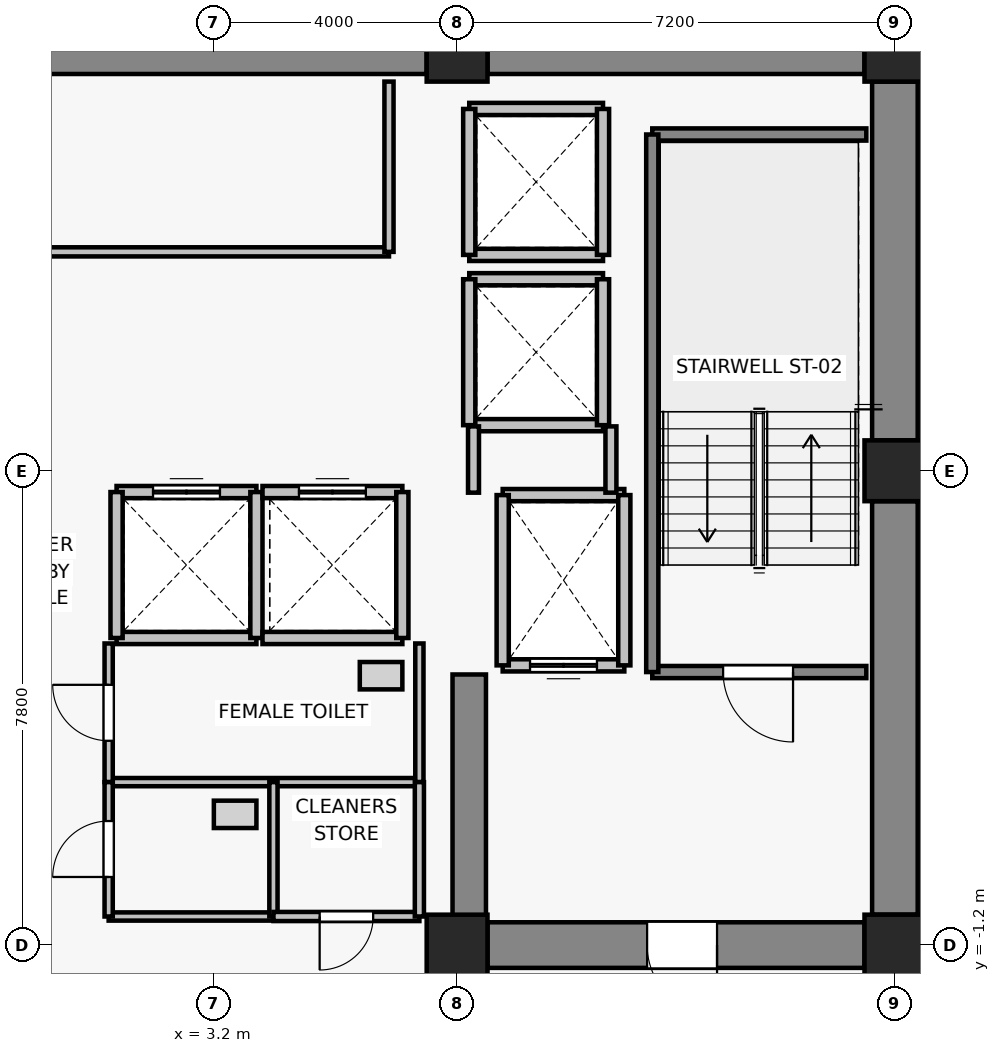
"""IFC4 building model, lengths in metres.
Left out: names, types, materials, properties, quantities, classifications, styles, units other than length and angle.
Written with IfcOpenShell. Run it as: python <this file> out.ifc"""

import sys

from ifc_helpers import new_model, si_unit, direction, frame, frame_2d, origin, origin_2d, place, context, subcontext, project, spatial, rectangle, extrude, source, transform, mapped, element, fill, save


model = new_model("IFC4")
c1 = context("Model", 3, precision=1e-05, world=origin(), true_north=direction((0.0, 1.0)))
c2 = subcontext(c1, "Body", "Model", "MODEL_VIEW")
j1 = project(units=[si_unit("LENGTHUNIT", "METRE"), si_unit("PLANEANGLEUNIT", "RADIAN")], contexts=[c1])
p1 = place(None, origin())
s1 = spatial("IfcSite", under=j1, at=p1, CompositionType="ELEMENT")
p2 = place(p1, origin())
s2 = spatial("IfcBuilding", under=s1, at=p2, CompositionType="ELEMENT")
p3 = place(p2, frame((0.0, 0.0, 103.3)))
s3 = spatial("IfcBuildingStorey", under=s2, at=p3, CompositionType="ELEMENT", Elevation=103.3)
for number, where, z_axis, x_axis in (
    (1, (7.2, -1.2, 0.0), (0.0, 0.0, 1.0), (1.0, 0.0, 0.0)),
    (2, (14.4, -1.2, 0.0), (0.0, 0.0, 1.0), (1.0, 0.0, 0.0)),
    (3, (14.4, 6.6, 0.0), (0.0, 0.0, 1.0), (1.0, 0.0, 0.0)),
    (4, (7.2, 13.5, 0.0), (0.0, 0.0, 1.0), (1.0, 0.0, 0.0)),
    (5, (14.4, 13.5, 0.0), (0.0, 0.0, 1.0), (1.0, 0.0, 0.0)),
):
    element("IfcColumn", number, at=place(p3, frame(where, z_axis=z_axis, x_axis=x_axis)), inside=s3, PredefinedType="COLUMN", context=c2, shape_type="SweptSolid", body=[
        extrude(rectangle(XDim=1.0, YDim=1.0, at=origin_2d()), origin(), (0.0, 0.0, 1.0), 3.3),
    ])
p4 = place(p3, frame((-6.7, 13.5, 0.0), z_axis=(0.0, 0.0, 1.0), x_axis=(1.0, 0.0, 0.0)))
e6 = element("IfcWall", 6, at=p4, inside=s3, PredefinedType="SHEAR", context=c2, shape_type="SweptSolid", body=[
    extrude(rectangle(XDim=13.4, YDim=0.75, at=frame_2d((6.7, 0.0))), origin(), (0.0, 0.0, 1.0), 3.075),
])
p5 = place(p3, frame((7.7, 13.5, 0.0), z_axis=(0.0, 0.0, 1.0), x_axis=(1.0, 0.0, 0.0)))
e7 = element("IfcWall", 7, at=p5, inside=s3, PredefinedType="SHEAR", context=c2, shape_type="SweptSolid", body=[
    extrude(rectangle(XDim=6.2, YDim=0.75, at=frame_2d((3.1, 0.0))), origin(), (0.0, 0.0, 1.0), 3.075),
])
p6 = place(p3, frame((14.4, -0.7, 0.0), z_axis=(0.0, 0.0, 1.0), x_axis=(0.0, 1.0, 0.0)))
e8 = element("IfcWall", 8, at=p6, inside=s3, PredefinedType="SHEAR", context=c2, shape_type="SweptSolid", body=[
    extrude(rectangle(XDim=6.8, YDim=0.75, at=frame_2d((3.4, 0.0))), origin(), (0.0, 0.0, 1.0), 3.075),
])
p7 = place(p3, frame((14.4, 7.1, 0.0), z_axis=(0.0, 0.0, 1.0), x_axis=(0.0, 1.0, 0.0)))
e9 = element("IfcWall", 9, at=p7, inside=s3, PredefinedType="SHEAR", context=c2, shape_type="SweptSolid", body=[
    extrude(rectangle(XDim=5.9, YDim=0.75, at=frame_2d((2.95, 0.0))), origin(), (0.0, 0.0, 1.0), 3.075),
])
p8 = place(p3, frame((13.9, -1.2, 0.0), z_axis=(0.0, 0.0, 1.0), x_axis=(-1.0, 0.0, 0.0)))
e10 = element("IfcWall", 10, at=p8, inside=s3, PredefinedType="SHEAR", context=c2, shape_type="SweptSolid", body=[
    extrude(rectangle(XDim=6.2, YDim=0.75, at=frame_2d((3.1, 0.0))), origin(), (0.0, 0.0, 1.0), 3.075),
])
p9 = place(p8, frame((2.425, 0.0, 0.0)))
e11 = element("IfcOpeningElement", 11, at=p9, cuts=e10, PredefinedType="OPENING", context=c2, shape_type="SweptSolid", body=[
    extrude(rectangle(XDim=1.15, YDim=2.15, at=frame_2d((0.575, 1.075))), frame((0.0, 0.385, 0.0), z_axis=(0.0, -1.0, 0.0), x_axis=(1.0, 0.0, 0.0)), (0.0, 0.0, 1.0), 0.77),
])
p10 = place(p3, frame((7.4, -0.825, 0.0), z_axis=(0.0, 0.0, 1.0), x_axis=(0.0, 1.0, 0.0)))
e12 = element("IfcWall", 12, at=p10, inside=s3, PredefinedType="SHEAR", context=c2, shape_type="SweptSolid", body=[
    extrude(rectangle(XDim=4.075, YDim=0.55, at=frame_2d((2.038, 0.0))), origin(), (0.0, 0.0, 1.0), 3.075),
])
p11 = place(p3, frame((9.95, 3.4, 0.0), z_axis=(0.0, 0.0, 1.0), x_axis=(-1.0, 0.0, 0.0)))
e13 = element("IfcWall", 13, at=p11, inside=s3, PredefinedType="SOLIDWALL", context=c2, shape_type="SweptSolid", body=[
    extrude(rectangle(XDim=2.0, YDim=0.2, at=frame_2d((1.0, 0.0))), origin(), (0.0, 0.0, 1.0), 3.075),
])
p12 = place(p11, frame((0.45, 0.0, 0.0)))
e14 = element("IfcOpeningElement", 14, at=p12, cuts=e13, PredefinedType="OPENING", context=c2, shape_type="SweptSolid", body=[
    extrude(rectangle(XDim=1.1, YDim=2.2, at=frame_2d((0.55, 1.1))), frame((0.0, 0.11, 0.0), z_axis=(0.0, -1.0, 0.0), x_axis=(1.0, 0.0, 0.0)), (0.0, 0.0, 1.0), 0.22),
])
p13 = place(p3, frame((7.95, 6.2, 0.0), z_axis=(0.0, 0.0, 1.0), x_axis=(1.0, 0.0, 0.0)))
e15 = element("IfcWall", 15, at=p13, inside=s3, PredefinedType="SOLIDWALL", context=c2, shape_type="SweptSolid", body=[
    extrude(rectangle(XDim=2.0, YDim=0.2, at=frame_2d((1.0, 0.0))), origin(), (0.0, 0.0, 1.0), 3.075),
])
for number, where, z_axis, x_axis in (
    (16, (7.95, 3.4, 0.0), (0.0, 0.0, 1.0), (0.0, 1.0, 0.0)),
    (17, (9.95, 6.2, 0.0), (0.0, 0.0, 1.0), (0.0, -1.0, 0.0)),
):
    element("IfcWall", number, at=place(p3, frame(where, z_axis=z_axis, x_axis=x_axis)), inside=s3, PredefinedType="SOLIDWALL", context=c2, shape_type="SweptSolid", body=[
        extrude(rectangle(XDim=2.8, YDim=0.2, at=frame_2d((1.4, 0.0))), origin(), (0.0, 0.0, 1.0), 3.075),
    ])
p14 = place(p3, frame((3.9, 3.85, 0.0), z_axis=(0.0, 0.0, 1.0), x_axis=(-1.0, 0.0, 0.0)))
e18 = element("IfcWall", 18, at=p14, inside=s3, PredefinedType="SOLIDWALL", context=c2, shape_type="SweptSolid", body=[
    extrude(rectangle(XDim=2.3, YDim=0.2, at=frame_2d((1.15, 0.0))), origin(), (0.0, 0.0, 1.0), 3.075),
])
p15 = place(p3, frame((1.6, 6.25, 0.0), z_axis=(0.0, 0.0, 1.0), x_axis=(1.0, 0.0, 0.0)))
e19 = element("IfcWall", 19, at=p15, inside=s3, PredefinedType="SOLIDWALL", context=c2, shape_type="SweptSolid", body=[
    extrude(rectangle(XDim=2.3, YDim=0.2, at=frame_2d((1.15, 0.0))), origin(), (0.0, 0.0, 1.0), 3.075),
])
p16 = place(p15, frame((0.6, 0.0, 0.0)))
e20 = element("IfcOpeningElement", 20, at=p16, cuts=e19, PredefinedType="OPENING", context=c2, shape_type="SweptSolid", body=[
    extrude(rectangle(XDim=1.1, YDim=2.2, at=frame_2d((0.55, 1.1))), frame((0.0, 0.11, 0.0), z_axis=(0.0, -1.0, 0.0), x_axis=(1.0, 0.0, 0.0)), (0.0, 0.0, 1.0), 0.22),
])
for number, where, z_axis, x_axis in (
    (21, (1.6, 3.85, 0.0), (0.0, 0.0, 1.0), (0.0, 1.0, 0.0)),
    (22, (3.9, 6.25, 0.0), (0.0, 0.0, 1.0), (0.0, -1.0, 0.0)),
):
    element("IfcWall", number, at=place(p3, frame(where, z_axis=z_axis, x_axis=x_axis)), inside=s3, PredefinedType="SOLIDWALL", context=c2, shape_type="SweptSolid", body=[
        extrude(rectangle(XDim=2.4, YDim=0.2, at=frame_2d((1.2, 0.0))), origin(), (0.0, 0.0, 1.0), 3.075),
    ])
p17 = place(p3, frame((6.3, 3.85, 0.0), z_axis=(0.0, 0.0, 1.0), x_axis=(-1.0, 0.0, 0.0)))
e23 = element("IfcWall", 23, at=p17, inside=s3, PredefinedType="SOLIDWALL", context=c2, shape_type="SweptSolid", body=[
    extrude(rectangle(XDim=2.3, YDim=0.2, at=frame_2d((1.15, 0.0))), origin(), (0.0, 0.0, 1.0), 3.075),
])
p18 = place(p3, frame((4.0, 6.25, 0.0), z_axis=(0.0, 0.0, 1.0), x_axis=(1.0, 0.0, 0.0)))
e24 = element("IfcWall", 24, at=p18, inside=s3, PredefinedType="SOLIDWALL", context=c2, shape_type="SweptSolid", body=[
    extrude(rectangle(XDim=2.3, YDim=0.2, at=frame_2d((1.15, 0.0))), origin(), (0.0, 0.0, 1.0), 3.075),
])
p19 = place(p18, frame((0.6, 0.0, 0.0)))
e25 = element("IfcOpeningElement", 25, at=p19, cuts=e24, PredefinedType="OPENING", context=c2, shape_type="SweptSolid", body=[
    extrude(rectangle(XDim=1.1, YDim=2.2, at=frame_2d((0.55, 1.1))), frame((0.0, 0.11, 0.0), z_axis=(0.0, -1.0, 0.0), x_axis=(1.0, 0.0, 0.0)), (0.0, 0.0, 1.0), 0.22),
])
p20 = place(p3, frame((6.3, 6.25, 0.0), z_axis=(0.0, 0.0, 1.0), x_axis=(0.0, -1.0, 0.0)))
e26 = element("IfcWall", 26, at=p20, inside=s3, PredefinedType="SOLIDWALL", context=c2, shape_type="SweptSolid", body=[
    extrude(rectangle(XDim=2.4, YDim=0.2, at=frame_2d((1.2, 0.0))), origin(), (0.0, 0.0, 1.0), 3.075),
])
for number, where, z_axis, x_axis in (
    (27, (9.6, 7.35, 0.0), (0.0, 0.0, 1.0), (-1.0, 0.0, 0.0)),
    (28, (7.4, 9.75, 0.0), (0.0, 0.0, 1.0), (1.0, 0.0, 0.0)),
):
    element("IfcWall", number, at=place(p3, frame(where, z_axis=z_axis, x_axis=x_axis)), inside=s3, PredefinedType="SOLIDWALL", context=c2, shape_type="SweptSolid", body=[
        extrude(rectangle(XDim=2.2, YDim=0.2, at=frame_2d((1.1, 0.0))), origin(), (0.0, 0.0, 1.0), 2.515),
    ])
p21 = place(p3, frame((7.4, 7.35, 0.0), z_axis=(0.0, 0.0, 1.0), x_axis=(0.0, 1.0, 0.0)))
e29 = element("IfcWall", 29, at=p21, inside=s3, PredefinedType="SOLIDWALL", context=c2, shape_type="SweptSolid", body=[
    extrude(rectangle(XDim=2.4, YDim=0.2, at=frame_2d((1.2, 0.0))), origin(), (0.0, 0.0, 1.0), 2.515),
])
p22 = place(p3, frame((9.6, 9.75, 0.0), z_axis=(0.0, 0.0, 1.0), x_axis=(0.0, -1.0, 0.0)))
e30 = element("IfcWall", 30, at=p22, inside=s3, PredefinedType="SOLIDWALL", context=c2, shape_type="SweptSolid", body=[
    extrude(rectangle(XDim=2.4, YDim=0.2, at=frame_2d((1.2, 0.0))), origin(), (0.0, 0.0, 1.0), 3.075),
])
for number, where, z_axis, x_axis in (
    (31, (9.6, 10.15, 0.0), (0.0, 0.0, 1.0), (-1.0, 0.0, 0.0)),
    (32, (7.4, 12.55, 0.0), (0.0, 0.0, 1.0), (1.0, 0.0, 0.0)),
):
    element("IfcWall", number, at=place(p3, frame(where, z_axis=z_axis, x_axis=x_axis)), inside=s3, PredefinedType="SOLIDWALL", context=c2, shape_type="SweptSolid", body=[
        extrude(rectangle(XDim=2.2, YDim=0.2, at=frame_2d((1.1, 0.0))), origin(), (0.0, 0.0, 1.0), 2.515),
    ])
p23 = place(p3, frame((7.4, 10.15, 0.0), z_axis=(0.0, 0.0, 1.0), x_axis=(0.0, 1.0, 0.0)))
e33 = element("IfcWall", 33, at=p23, inside=s3, PredefinedType="SOLIDWALL", context=c2, shape_type="SweptSolid", body=[
    extrude(rectangle(XDim=2.4, YDim=0.2, at=frame_2d((1.2, 0.0))), origin(), (0.0, 0.0, 1.0), 2.515),
])
p24 = place(p3, frame((9.6, 12.55, 0.0), z_axis=(0.0, 0.0, 1.0), x_axis=(0.0, -1.0, 0.0)))
e34 = element("IfcWall", 34, at=p24, inside=s3, PredefinedType="SOLIDWALL", context=c2, shape_type="SweptSolid", body=[
    extrude(rectangle(XDim=2.4, YDim=0.2, at=frame_2d((1.2, 0.0))), origin(), (0.0, 0.0, 1.0), 3.075),
])
p25 = place(p3, frame((13.93, 3.29, 0.0), z_axis=(0.0, 0.0, 1.0), x_axis=(-1.0, 0.0, 0.0)))
e35 = element("IfcWall", 35, at=p25, inside=s3, PredefinedType="SOLIDWALL", context=c2, shape_type="SweptSolid", body=[
    extrude(rectangle(XDim=3.52, YDim=0.2, at=frame_2d((1.76, 0.0))), origin(), (0.0, 0.0, 1.0), 3.075),
])
p26 = place(p25, frame((1.205, 0.0, 0.0)))
e36 = element("IfcOpeningElement", 36, at=p26, cuts=e35, PredefinedType="OPENING", context=c2, shape_type="SweptSolid", body=[
    extrude(rectangle(XDim=1.15, YDim=2.15, at=frame_2d((0.575, 1.075))), frame((0.0, 0.11, 0.0), z_axis=(0.0, -1.0, 0.0), x_axis=(1.0, 0.0, 0.0)), (0.0, 0.0, 1.0), 0.22),
])
p27 = place(p3, frame((10.41, 12.13, 0.0), z_axis=(0.0, 0.0, 1.0), x_axis=(1.0, 0.0, 0.0)))
e37 = element("IfcWall", 37, at=p27, inside=s3, PredefinedType="SOLIDWALL", context=c2, shape_type="SweptSolid", body=[
    extrude(rectangle(XDim=3.52, YDim=0.2, at=frame_2d((1.76, 0.0))), origin(), (0.0, 0.0, 1.0), 3.075),
])
p28 = place(p3, frame((10.41, 3.29, 0.0), z_axis=(0.0, 0.0, 1.0), x_axis=(0.0, 1.0, 0.0)))
e38 = element("IfcWall", 38, at=p28, inside=s3, PredefinedType="SOLIDWALL", context=c2, shape_type="SweptSolid", body=[
    extrude(rectangle(XDim=8.84, YDim=0.2, at=frame_2d((4.42, 0.0))), origin(), (0.0, 0.0, 1.0), 3.075),
])
p29 = place(p3, frame((7.47, 6.24, 0.0), z_axis=(0.0, 0.0, 1.0), x_axis=(0.0, 1.0, 0.0)))
e39 = element("IfcWall", 39, at=p29, inside=s3, PredefinedType="PARTITIONING", context=c2, shape_type="SweptSolid", body=[
    extrude(rectangle(XDim=1.09, YDim=0.18, at=frame_2d((0.545, 0.0))), origin(), (0.0, 0.0, 1.0), 2.515),
])
p30 = place(p3, frame((9.73, 7.33, 0.0), z_axis=(0.0, 0.0, 1.0), x_axis=(0.0, -1.0, 0.0)))
e40 = element("IfcWall", 40, at=p30, inside=s3, PredefinedType="PARTITIONING", context=c2, shape_type="SweptSolid", body=[
    extrude(rectangle(XDim=1.09, YDim=0.18, at=frame_2d((0.545, 0.0))), origin(), (0.0, 0.0, 1.0), 3.075),
])
p31 = place(p3, frame((6.08, 10.2, 0.0), z_axis=(0.0, 0.0, 1.0), x_axis=(-1.0, 0.0, 0.0)))
e41 = element("IfcWall", 41, at=p31, inside=s3, PredefinedType="PARTITIONING", context=c2, shape_type="SweptSolid", body=[
    extrude(rectangle(XDim=12.16, YDim=0.15, at=frame_2d((6.08, 0.0))), origin(), (0.0, 0.0, 1.0), 3.075),
])
p32 = place(p31, frame((7.005, 0.0, 0.0)))
e42 = element("IfcOpeningElement", 42, at=p32, cuts=e41, PredefinedType="OPENING", context=c2, shape_type="SweptSolid", body=[
    extrude(rectangle(XDim=1.15, YDim=2.15, at=frame_2d((0.575, 1.075))), frame((0.0, 0.085, 0.0), z_axis=(0.0, -1.0, 0.0), x_axis=(1.0, 0.0, 0.0)), (0.0, 0.0, 1.0), 0.17),
])
p33 = place(p3, frame((6.08, 13.0, 0.0), z_axis=(0.0, 0.0, 1.0), x_axis=(0.0, -1.0, 0.0)))
e43 = element("IfcWall", 43, at=p33, inside=s3, PredefinedType="PARTITIONING", context=c2, shape_type="SweptSolid", body=[
    extrude(rectangle(XDim=2.8, YDim=0.15, at=frame_2d((1.4, 0.0))), origin(), (0.0, 0.0, 1.0), 3.075),
])
p34 = place(p3, frame((6.58, 1.48, 0.0), z_axis=(0.0, 0.0, 1.0), x_axis=(-1.0, 0.0, 0.0)))
e44 = element("IfcWall", 44, at=p34, inside=s3, PredefinedType="PARTITIONING", context=c2, shape_type="SweptSolid", body=[
    extrude(rectangle(XDim=5.11, YDim=0.135, at=frame_2d((2.555, 0.0))), origin(), (0.0, 0.0, 1.0), 3.075),
])
p35 = place(p3, frame((1.47, 1.48, 0.0), z_axis=(0.0, 0.0, 1.0), x_axis=(0.0, 1.0, 0.0)))
e45 = element("IfcWall", 45, at=p35, inside=s3, PredefinedType="PARTITIONING", context=c2, shape_type="SweptSolid", body=[
    extrude(rectangle(XDim=2.28, YDim=0.135, at=frame_2d((1.14, 0.0))), origin(), (0.0, 0.0, 1.0), 3.075),
])
p36 = place(p35, frame((0.68, 0.0, 0.0)))
e46 = element("IfcOpeningElement", 46, at=p36, cuts=e45, PredefinedType="OPENING", context=c2, shape_type="SweptSolid", body=[
    extrude(rectangle(XDim=0.92, YDim=2.1, at=frame_2d((0.46, 1.05))), frame((0.0, 0.077, 0.0), z_axis=(0.0, -1.0, 0.0), x_axis=(1.0, 0.0, 0.0)), (0.0, 0.0, 1.0), 0.155),
])
p37 = place(p3, frame((6.58, 3.76, 0.0), z_axis=(0.0, 0.0, 1.0), x_axis=(0.0, -1.0, 0.0)))
e47 = element("IfcWall", 47, at=p37, inside=s3, PredefinedType="PARTITIONING", context=c2, shape_type="SweptSolid", body=[
    extrude(rectangle(XDim=2.28, YDim=0.135, at=frame_2d((1.14, 0.0))), origin(), (0.0, 0.0, 1.0), 3.075),
])
p38 = place(p3, frame((4.18, -0.73, 0.0), z_axis=(0.0, 0.0, 1.0), x_axis=(-1.0, 0.0, 0.0)))
e48 = element("IfcWall", 48, at=p38, inside=s3, PredefinedType="PARTITIONING", context=c2, shape_type="SweptSolid", body=[
    extrude(rectangle(XDim=2.71, YDim=0.135, at=frame_2d((1.355, 0.0))), origin(), (0.0, 0.0, 1.0), 3.075),
])
p39 = place(p3, frame((1.47, -0.73, 0.0), z_axis=(0.0, 0.0, 1.0), x_axis=(0.0, 1.0, 0.0)))
e49 = element("IfcWall", 49, at=p39, inside=s3, PredefinedType="PARTITIONING", context=c2, shape_type="SweptSolid", body=[
    extrude(rectangle(XDim=2.21, YDim=0.135, at=frame_2d((1.105, 0.0))), origin(), (0.0, 0.0, 1.0), 3.075),
])
p40 = place(p39, frame((0.65, 0.0, 0.0)))
e50 = element("IfcOpeningElement", 50, at=p40, cuts=e49, PredefinedType="OPENING", context=c2, shape_type="SweptSolid", body=[
    extrude(rectangle(XDim=0.92, YDim=2.1, at=frame_2d((0.46, 1.05))), frame((0.0, 0.077, 0.0), z_axis=(0.0, -1.0, 0.0), x_axis=(1.0, 0.0, 0.0)), (0.0, 0.0, 1.0), 0.155),
])
p41 = place(p3, frame((4.18, 1.48, 0.0), z_axis=(0.0, 0.0, 1.0), x_axis=(0.0, -1.0, 0.0)))
e51 = element("IfcWall", 51, at=p41, inside=s3, PredefinedType="PARTITIONING", context=c2, shape_type="SweptSolid", body=[
    extrude(rectangle(XDim=2.21, YDim=0.135, at=frame_2d((1.105, 0.0))), origin(), (0.0, 0.0, 1.0), 3.075),
])
p42 = place(p3, frame((6.58, -0.73, 0.0), z_axis=(0.0, 0.0, 1.0), x_axis=(-1.0, 0.0, 0.0)))
e52 = element("IfcWall", 52, at=p42, inside=s3, PredefinedType="PARTITIONING", context=c2, shape_type="SweptSolid", body=[
    extrude(rectangle(XDim=2.4, YDim=0.15, at=frame_2d((1.2, 0.0))), origin(), (0.0, 0.0, 1.0), 3.075),
])
p43 = place(p42, frame((0.76, 0.0, 0.0)))
e53 = element("IfcOpeningElement", 53, at=p43, cuts=e52, PredefinedType="OPENING", context=c2, shape_type="SweptSolid", body=[
    extrude(rectangle(XDim=0.88, YDim=2.1, at=frame_2d((0.44, 1.05))), frame((0.0, 0.085, 0.0), z_axis=(0.0, -1.0, 0.0), x_axis=(1.0, 0.0, 0.0)), (0.0, 0.0, 1.0), 0.17),
])
p44 = place(p3, frame((6.58, 1.48, 0.0), z_axis=(0.0, 0.0, 1.0), x_axis=(0.0, -1.0, 0.0)))
e54 = element("IfcWall", 54, at=p44, inside=s3, PredefinedType="PARTITIONING", context=c2, shape_type="SweptSolid", body=[
    extrude(rectangle(XDim=2.21, YDim=0.15, at=frame_2d((1.105, 0.0))), origin(), (0.0, 0.0, 1.0), 3.075),
])
m1 = source(origin(), c2, "Body", "SweptSolid", [
    extrude(rectangle(XDim=1.1, YDim=2.2, at=frame_2d((0.55, 1.1))), frame((0.0, 0.025, 0.0), z_axis=(0.0, -1.0, 0.0), x_axis=(1.0, 0.0, 0.0)), (0.0, 0.0, 1.0), 0.05),
])
p45 = place(p12, origin())
e55 = element("IfcDoor", 55, at=p45, inside=s3, OperationType="DOUBLE_DOOR_SLIDING", PredefinedType="DOOR", context=c2, shape_type="MappedRepresentation", body=[
    mapped(m1, transform((0.0, 0.0, 0.0), x_axis=(1.0, 0.0, 0.0), y_axis=(0.0, 1.0, 0.0), z_axis=(0.0, 0.0, 1.0), scale=1.0)),
])
fill(e14, e55)
p46 = place(p16, origin())
e56 = element("IfcDoor", 56, at=p46, inside=s3, OperationType="DOUBLE_DOOR_SLIDING", PredefinedType="DOOR", context=c2, shape_type="MappedRepresentation", body=[
    mapped(m1, transform((0.0, 0.0, 0.0), x_axis=(1.0, 0.0, 0.0), y_axis=(0.0, 1.0, 0.0), z_axis=(0.0, 0.0, 1.0), scale=1.0)),
])
fill(e20, e56)
p47 = place(p19, origin())
e57 = element("IfcDoor", 57, at=p47, inside=s3, OperationType="DOUBLE_DOOR_SLIDING", PredefinedType="DOOR", context=c2, shape_type="MappedRepresentation", body=[
    mapped(m1, transform((0.0, 0.0, 0.0), x_axis=(1.0, 0.0, 0.0), y_axis=(0.0, 1.0, 0.0), z_axis=(0.0, 0.0, 1.0), scale=1.0)),
])
fill(e25, e57)
m2 = source(origin(), c2, "Body", "SweptSolid", [
    extrude(rectangle(XDim=1.15, YDim=2.15, at=frame_2d((0.575, 1.075))), frame((0.0, 0.025, 0.0), z_axis=(0.0, -1.0, 0.0), x_axis=(1.0, 0.0, 0.0)), (0.0, 0.0, 1.0), 0.05),
])
p48 = place(p26, origin())
e58 = element("IfcDoor", 58, at=p48, inside=s3, OperationType="SINGLE_SWING_LEFT", PredefinedType="DOOR", context=c2, shape_type="MappedRepresentation", body=[
    mapped(m2, transform((0.0, 0.0, 0.0), x_axis=(1.0, 0.0, 0.0), y_axis=(0.0, 1.0, 0.0), z_axis=(0.0, 0.0, 1.0), scale=1.0)),
])
fill(e36, e58)
p49 = place(p9, origin())
e59 = element("IfcDoor", 59, at=p49, inside=s3, OperationType="SINGLE_SWING_LEFT", PredefinedType="DOOR", context=c2, shape_type="MappedRepresentation", body=[
    mapped(m2, transform((0.0, 0.0, 0.0), x_axis=(1.0, 0.0, 0.0), y_axis=(0.0, 1.0, 0.0), z_axis=(0.0, 0.0, 1.0), scale=1.0)),
])
fill(e11, e59)
m3 = source(origin(), c2, "Body", "SweptSolid", [
    extrude(rectangle(XDim=0.92, YDim=2.1, at=frame_2d((0.46, 1.05))), frame((0.0, 0.025, 0.0), z_axis=(0.0, -1.0, 0.0), x_axis=(1.0, 0.0, 0.0)), (0.0, 0.0, 1.0), 0.05),
])
p50 = place(p36, origin())
e60 = element("IfcDoor", 60, at=p50, inside=s3, OperationType="SINGLE_SWING_RIGHT", PredefinedType="DOOR", context=c2, shape_type="MappedRepresentation", body=[
    mapped(m3, transform((0.0, 0.0, 0.0), x_axis=(1.0, 0.0, 0.0), y_axis=(0.0, 1.0, 0.0), z_axis=(0.0, 0.0, 1.0), scale=1.0)),
])
fill(e46, e60)
p51 = place(p40, origin())
e61 = element("IfcDoor", 61, at=p51, inside=s3, OperationType="SINGLE_SWING_LEFT", PredefinedType="DOOR", context=c2, shape_type="MappedRepresentation", body=[
    mapped(m3, transform((0.0, 0.0, 0.0), x_axis=(1.0, 0.0, 0.0), y_axis=(0.0, 1.0, 0.0), z_axis=(0.0, 0.0, 1.0), scale=1.0)),
])
fill(e50, e61)
m4 = source(origin(), c2, "Body", "SweptSolid", [
    extrude(rectangle(XDim=0.88, YDim=2.1, at=frame_2d((0.44, 1.05))), frame((0.0, 0.025, 0.0), z_axis=(0.0, -1.0, 0.0), x_axis=(1.0, 0.0, 0.0)), (0.0, 0.0, 1.0), 0.05),
])
p52 = place(p43, origin())
e62 = element("IfcDoor", 62, at=p52, inside=s3, OperationType="SINGLE_SWING_RIGHT", PredefinedType="DOOR", context=c2, shape_type="MappedRepresentation", body=[
    mapped(m4, transform((0.0, 0.0, 0.0), x_axis=(1.0, 0.0, 0.0), y_axis=(0.0, 1.0, 0.0), z_axis=(0.0, 0.0, 1.0), scale=1.0)),
])
fill(e53, e62)
save(model, sys.argv[1])
